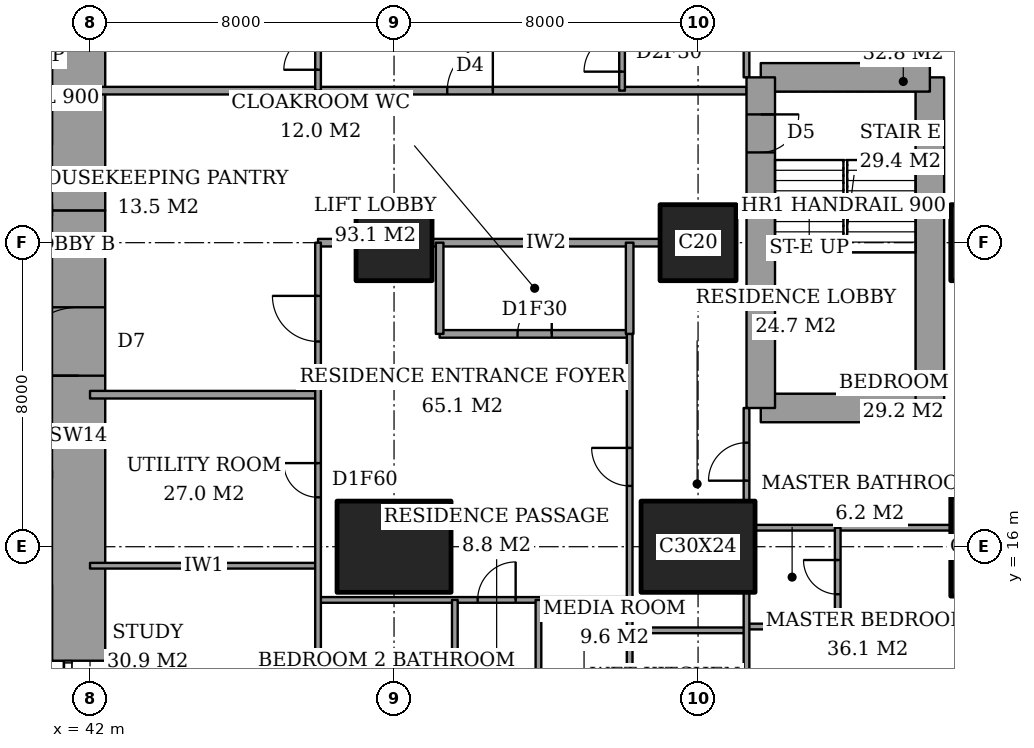
"""IFC4 building model, lengths in metres.
Left out: names, types, materials, properties, quantities, classifications, styles, units other than length and angle.
Written with IfcOpenShell. Run it as: python <this file> out.ifc"""

import sys

from ifc_helpers import new_model, si_unit, direction, frame, frame_2d, origin, origin_2d, place, context, subcontext, project, spatial, rectangle, extrude, element, fill, save


model = new_model("IFC4")
c1 = context("Model", 3, precision=1e-05, world=origin(), true_north=direction((0.0, 1.0)))
c2 = subcontext(c1, "Body", "Model", "MODEL_VIEW")
j1 = project(units=[si_unit("LENGTHUNIT", "METRE"), si_unit("PLANEANGLEUNIT", "RADIAN")], contexts=[c1])
p1 = place(None, origin())
s1 = spatial("IfcSite", under=j1, at=p1, CompositionType="ELEMENT")
p2 = place(p1, origin())
s2 = spatial("IfcBuilding", under=s1, at=p2, CompositionType="ELEMENT")
p3 = place(p2, frame((0.0, 0.0, 40.4)))
s3 = spatial("IfcBuildingStorey", under=s2, at=p3, CompositionType="ELEMENT", Elevation=40.4)
p4 = place(p3, frame((50.0, 16.0, 0.0), z_axis=(0.0, 0.0, 1.0), x_axis=(1.0, 0.0, 0.0)))
e1 = element("IfcColumn", 1, at=p4, inside=s3, PredefinedType="COLUMN", context=c2, shape_type="SweptSolid", body=[
    extrude(rectangle(XDim=3.0, YDim=2.4, at=origin_2d()), origin(), (0.0, 0.0, 1.0), 3.6),
])
p5 = place(p3, frame((50.0, 24.0, 0.0), z_axis=(0.0, 0.0, 1.0), x_axis=(1.0, 0.0, 0.0)))
e2 = element("IfcColumn", 2, at=p5, inside=s3, PredefinedType="COLUMN", context=c2, shape_type="SweptSolid", body=[
    extrude(rectangle(XDim=2.0, YDim=2.0, at=origin_2d()), origin(), (0.0, 0.0, 1.0), 3.6),
])
p6 = place(p3, frame((58.0, 16.0, 0.0), z_axis=(0.0, 0.0, 1.0), x_axis=(1.0, 0.0, 0.0)))
e3 = element("IfcColumn", 3, at=p6, inside=s3, PredefinedType="COLUMN", context=c2, shape_type="SweptSolid", body=[
    extrude(rectangle(XDim=3.0, YDim=2.4, at=origin_2d()), origin(), (0.0, 0.0, 1.0), 3.6),
])
p7 = place(p3, frame((58.0, 24.0, 0.0), z_axis=(0.0, 0.0, 1.0), x_axis=(1.0, 0.0, 0.0)))
e4 = element("IfcColumn", 4, at=p7, inside=s3, PredefinedType="COLUMN", context=c2, shape_type="SweptSolid", body=[
    extrude(rectangle(XDim=2.0, YDim=2.0, at=origin_2d()), origin(), (0.0, 0.0, 1.0), 3.6),
])
p8 = place(p3, frame((65.65, 16.0, 0.0), z_axis=(0.0, 0.0, 1.0), x_axis=(0.0, 1.0, 0.0)))
e5 = element("IfcColumn", 5, at=p8, inside=s3, PredefinedType="COLUMN", context=c2, shape_type="SweptSolid", body=[
    extrude(rectangle(XDim=2.6, YDim=2.0, at=origin_2d()), origin(), (0.0, 0.0, 1.0), 3.6),
])
p9 = place(p3, frame((65.65, 24.0, 0.0), z_axis=(0.0, 0.0, 1.0), x_axis=(1.0, 0.0, 0.0)))
e6 = element("IfcColumn", 6, at=p9, inside=s3, PredefinedType="COLUMN", context=c2, shape_type="SweptSolid", body=[
    extrude(rectangle(XDim=2.0, YDim=2.0, at=origin_2d()), origin(), (0.0, 0.0, 1.0), 3.6),
])
p10 = place(p3, frame((41.7, 13.0, 0.0), z_axis=(0.0, 0.0, 1.0), x_axis=(0.0, 1.0, 0.0)))
e7 = element("IfcWall", 7, at=p10, inside=s3, PredefinedType="SHEAR", context=c2, shape_type="SweptSolid", body=[
    extrude(rectangle(XDim=11.85, YDim=1.4, at=frame_2d((5.925, 0.0))), origin(), (0.0, 0.0, 1.0), 3.6),
])
p11 = place(p10, frame((7.5, 0.0, 0.0)))
e8 = element("IfcOpeningElement", 8, at=p11, cuts=e7, PredefinedType="OPENING", context=c2, shape_type="SweptSolid", body=[
    extrude(rectangle(XDim=1.8, YDim=2.4, at=frame_2d((0.9, 1.2))), frame((0.0, 0.71, 0.0), z_axis=(0.0, -1.0, 0.0), x_axis=(1.0, 0.0, 0.0)), (0.0, 0.0, 1.0), 1.42),
])
p12 = place(p3, frame((41.7, 24.85, 0.0), z_axis=(0.0, 0.0, 1.0), x_axis=(0.0, 1.0, 0.0)))
e9 = element("IfcWall", 9, at=p12, inside=s3, PredefinedType="SHEAR", context=c2, shape_type="SweptSolid", body=[
    extrude(rectangle(XDim=10.15, YDim=1.4, at=frame_2d((5.075, 0.0))), origin(), (0.0, 0.0, 1.0), 3.6),
])
p13 = place(p3, frame((59.65, 19.65, 0.0), z_axis=(0.0, 0.0, 1.0), x_axis=(1.0, 0.0, 0.0)))
e10 = element("IfcWall", 10, at=p13, inside=s3, PredefinedType="SHEAR", context=c2, shape_type="SweptSolid", body=[
    extrude(rectangle(XDim=4.45, YDim=0.75, at=frame_2d((2.225, 0.0))), origin(), (0.0, 0.0, 1.0), 3.6),
])
p14 = place(p3, frame((64.1, 19.65, 0.0), z_axis=(0.0, 0.0, 1.0), x_axis=(0.0, 1.0, 0.0)))
e11 = element("IfcWall", 11, at=p14, inside=s3, PredefinedType="SHEAR", context=c2, shape_type="SweptSolid", body=[
    extrude(rectangle(XDim=8.7, YDim=0.75, at=frame_2d((4.35, 0.0))), origin(), (0.0, 0.0, 1.0), 3.6),
])
p15 = place(p3, frame((64.1, 28.35, 0.0), z_axis=(0.0, 0.0, 1.0), x_axis=(-1.0, 0.0, 0.0)))
e12 = element("IfcWall", 12, at=p15, inside=s3, PredefinedType="SHEAR", context=c2, shape_type="SweptSolid", body=[
    extrude(rectangle(XDim=4.45, YDim=0.75, at=frame_2d((2.225, 0.0))), origin(), (0.0, 0.0, 1.0), 3.6),
])
p16 = place(p3, frame((59.65, 28.35, 0.0), z_axis=(0.0, 0.0, 1.0), x_axis=(0.0, -1.0, 0.0)))
e13 = element("IfcWall", 13, at=p16, inside=s3, PredefinedType="SHEAR", context=c2, shape_type="SweptSolid", body=[
    extrude(rectangle(XDim=8.7, YDim=0.75, at=frame_2d((4.35, 0.0))), origin(), (0.0, 0.0, 1.0), 3.6),
])
p17 = place(p16, frame((0.975, 0.0, 0.0)))
e14 = element("IfcOpeningElement", 14, at=p17, cuts=e13, PredefinedType="OPENING", context=c2, shape_type="SweptSolid", body=[
    extrude(rectangle(XDim=1.0, YDim=2.1, at=frame_2d((0.5, 1.05))), frame((0.0, 0.385, 0.0), z_axis=(0.0, -1.0, 0.0), x_axis=(1.0, 0.0, 0.0)), (0.0, 0.0, 1.0), 0.77),
])
p18 = place(p3, frame((56.2, 13.8, 0.0), z_axis=(0.0, 0.0, 1.0), x_axis=(1.0, 0.0, 0.0)))
e15 = element("IfcWall", 15, at=p18, inside=s3, PredefinedType="PARTITIONING", context=c2, shape_type="SweptSolid", body=[
    extrude(rectangle(XDim=3.075, YDim=0.15, at=frame_2d((1.538, 0.0))), origin(), (0.0, 0.0, 1.0), 3.35),
])
p19 = place(p3, frame((59.275, 13.9, 0.0), z_axis=(0.0, 0.0, 1.0), x_axis=(1.0, 0.0, 0.0)))
e16 = element("IfcWall", 16, at=p19, inside=s3, PredefinedType="PARTITIONING", context=c2, shape_type="SweptSolid", body=[
    extrude(rectangle(XDim=2.4, YDim=0.15, at=frame_2d((1.2, 0.0))), origin(), (0.0, 0.0, 1.0), 3.35),
])
p20 = place(p3, frame((48.0, 14.6, 0.0), z_axis=(0.0, 0.0, 1.0), x_axis=(1.0, 0.0, 0.0)))
e17 = element("IfcWall", 17, at=p20, inside=s3, PredefinedType="PARTITIONING", context=c2, shape_type="SweptSolid", body=[
    extrude(rectangle(XDim=8.2, YDim=0.15, at=frame_2d((4.1, 0.0))), origin(), (0.0, 0.0, 1.0), 3.35),
])
p21 = place(p20, frame((4.2, 0.0, 0.0)))
e18 = element("IfcOpeningElement", 18, at=p21, cuts=e17, PredefinedType="OPENING", context=c2, shape_type="SweptSolid", body=[
    extrude(rectangle(XDim=1.0, YDim=2.1, at=frame_2d((0.5, 1.05))), frame((0.0, 0.085, 0.0), z_axis=(0.0, -1.0, 0.0), x_axis=(1.0, 0.0, 0.0)), (0.0, 0.0, 1.0), 0.17),
])
p22 = place(p3, frame((42.0, 15.5, 0.0), z_axis=(0.0, 0.0, 1.0), x_axis=(1.0, 0.0, 0.0)))
e19 = element("IfcWall", 19, at=p22, inside=s3, PredefinedType="PARTITIONING", context=c2, shape_type="SweptSolid", body=[
    extrude(rectangle(XDim=6.0, YDim=0.15, at=frame_2d((3.0, 0.0))), origin(), (0.0, 0.0, 1.0), 3.35),
])
p23 = place(p3, frame((59.5, 16.5, 0.0), z_axis=(0.0, 0.0, 1.0), x_axis=(1.0, 0.0, 0.0)))
e20 = element("IfcWall", 20, at=p23, inside=s3, PredefinedType="PARTITIONING", context=c2, shape_type="SweptSolid", body=[
    extrude(rectangle(XDim=5.15, YDim=0.15, at=frame_2d((2.575, 0.0))), origin(), (0.0, 0.0, 1.0), 3.35),
])
p24 = place(p3, frame((42.0, 20.0, 0.0), z_axis=(0.0, 0.0, 1.0), x_axis=(1.0, 0.0, 0.0)))
e21 = element("IfcWall", 21, at=p24, inside=s3, PredefinedType="PARTITIONING", context=c2, shape_type="SweptSolid", body=[
    extrude(rectangle(XDim=6.0, YDim=0.2, at=frame_2d((3.0, 0.0))), origin(), (0.0, 0.0, 1.0), 3.35),
])
p25 = place(p3, frame((51.2, 21.6, 0.0), z_axis=(0.0, 0.0, 1.0), x_axis=(1.0, 0.0, 0.0)))
e22 = element("IfcWall", 22, at=p25, inside=s3, PredefinedType="PARTITIONING", context=c2, shape_type="SweptSolid", body=[
    extrude(rectangle(XDim=5.0, YDim=0.2, at=frame_2d((2.5, 0.0))), origin(), (0.0, 0.0, 1.0), 3.35),
])
p26 = place(p25, frame((2.05, 0.0, 0.0)))
e23 = element("IfcOpeningElement", 23, at=p26, cuts=e22, PredefinedType="OPENING", context=c2, shape_type="SweptSolid", body=[
    extrude(rectangle(XDim=0.9, YDim=2.1, at=frame_2d((0.45, 1.05))), frame((0.0, 0.11, 0.0), z_axis=(0.0, -1.0, 0.0), x_axis=(1.0, 0.0, 0.0)), (0.0, 0.0, 1.0), 0.22),
])
p27 = place(p3, frame((48.0, 24.0, 0.0), z_axis=(0.0, 0.0, 1.0), x_axis=(1.0, 0.0, 0.0)))
e24 = element("IfcWall", 24, at=p27, inside=s3, PredefinedType="PARTITIONING", context=c2, shape_type="SweptSolid", body=[
    extrude(rectangle(XDim=1.0, YDim=0.2, at=frame_2d((0.5, 0.0))), origin(), (0.0, 0.0, 1.0), 3.35),
])
p28 = place(p3, frame((51.0, 24.0, 0.0), z_axis=(0.0, 0.0, 1.0), x_axis=(1.0, 0.0, 0.0)))
e25 = element("IfcWall", 25, at=p28, inside=s3, PredefinedType="PARTITIONING", context=c2, shape_type="SweptSolid", body=[
    extrude(rectangle(XDim=6.0, YDim=0.2, at=frame_2d((3.0, 0.0))), origin(), (0.0, 0.0, 1.0), 3.35),
])
p29 = place(p3, frame((42.0, 28.0, 0.0), z_axis=(0.0, 0.0, 1.0), x_axis=(1.0, 0.0, 0.0)))
e26 = element("IfcWall", 26, at=p29, inside=s3, PredefinedType="PARTITIONING", context=c2, shape_type="SweptSolid", body=[
    extrude(rectangle(XDim=17.275, YDim=0.2, at=frame_2d((8.637, 0.0))), origin(), (0.0, 0.0, 1.0), 3.35),
])
p30 = place(p29, frame((9.4, 0.0, 0.0)))
e27 = element("IfcOpeningElement", 27, at=p30, cuts=e26, PredefinedType="OPENING", context=c2, shape_type="SweptSolid", body=[
    extrude(rectangle(XDim=1.2, YDim=2.4, at=frame_2d((0.6, 1.2))), frame((0.0, 0.11, 0.0), z_axis=(0.0, -1.0, 0.0), x_axis=(1.0, 0.0, 0.0)), (0.0, 0.0, 1.0), 0.22),
])
p31 = place(p3, frame((48.0, 10.6, 0.0), z_axis=(0.0, 0.0, 1.0), x_axis=(0.0, 1.0, 0.0)))
e28 = element("IfcWall", 28, at=p31, inside=s3, PredefinedType="PARTITIONING", context=c2, shape_type="SweptSolid", body=[
    extrude(rectangle(XDim=13.4, YDim=0.15, at=frame_2d((6.7, 0.0))), origin(), (0.0, 0.0, 1.0), 3.35),
])
p32 = place(p31, frame((10.8, 0.0, 0.0)))
e29 = element("IfcOpeningElement", 29, at=p32, cuts=e28, PredefinedType="OPENING", context=c2, shape_type="SweptSolid", body=[
    extrude(rectangle(XDim=1.2, YDim=2.4, at=frame_2d((0.6, 1.2))), frame((0.0, 0.085, 0.0), z_axis=(0.0, -1.0, 0.0), x_axis=(1.0, 0.0, 0.0)), (0.0, 0.0, 1.0), 0.17),
])
p33 = place(p31, frame((6.7, 0.0, 0.0)))
e30 = element("IfcOpeningElement", 30, at=p33, cuts=e28, PredefinedType="OPENING", context=c2, shape_type="SweptSolid", body=[
    extrude(rectangle(XDim=0.9, YDim=2.1, at=frame_2d((0.45, 1.05))), frame((0.0, 0.085, 0.0), z_axis=(0.0, -1.0, 0.0), x_axis=(1.0, 0.0, 0.0)), (0.0, 0.0, 1.0), 0.17),
])
p34 = place(p3, frame((48.0, 28.0, 0.0), z_axis=(0.0, 0.0, 1.0), x_axis=(0.0, 1.0, 0.0)))
e31 = element("IfcWall", 31, at=p34, inside=s3, PredefinedType="PARTITIONING", context=c2, shape_type="SweptSolid", body=[
    extrude(rectangle(XDim=9.4, YDim=0.15, at=frame_2d((4.7, 0.0))), origin(), (0.0, 0.0, 1.0), 3.35),
])
p35 = place(p34, frame((0.55, 0.0, 0.0)))
e32 = element("IfcOpeningElement", 32, at=p35, cuts=e31, PredefinedType="OPENING", context=c2, shape_type="SweptSolid", body=[
    extrude(rectangle(XDim=0.9, YDim=2.1, at=frame_2d((0.45, 1.05))), frame((0.0, 0.085, 0.0), z_axis=(0.0, -1.0, 0.0), x_axis=(1.0, 0.0, 0.0)), (0.0, 0.0, 1.0), 0.17),
])
p36 = place(p3, frame((51.2, 21.6, 0.0), z_axis=(0.0, 0.0, 1.0), x_axis=(0.0, 1.0, 0.0)))
e33 = element("IfcWall", 33, at=p36, inside=s3, PredefinedType="PARTITIONING", context=c2, shape_type="SweptSolid", body=[
    extrude(rectangle(XDim=2.4, YDim=0.2, at=frame_2d((1.2, 0.0))), origin(), (0.0, 0.0, 1.0), 3.35),
])
for number, where, z_axis, x_axis in (
    (34, (51.6, 10.6, 0.0), (0.0, 0.0, 1.0), (0.0, 1.0, 0.0)),
    (35, (53.8, 10.6, 0.0), (0.0, 0.0, 1.0), (0.0, 1.0, 0.0)),
):
    element("IfcWall", number, at=place(p3, frame(where, z_axis=z_axis, x_axis=x_axis)), inside=s3, PredefinedType="PARTITIONING", context=c2, shape_type="SweptSolid", body=[
        extrude(rectangle(XDim=4.0, YDim=0.15, at=frame_2d((2.0, 0.0))), origin(), (0.0, 0.0, 1.0), 3.35),
    ])
p37 = place(p3, frame((56.0, 28.0, 0.0), z_axis=(0.0, 0.0, 1.0), x_axis=(0.0, 1.0, 0.0)))
e36 = element("IfcWall", 36, at=p37, inside=s3, PredefinedType="PARTITIONING", context=c2, shape_type="SweptSolid", body=[
    extrude(rectangle(XDim=9.4, YDim=0.15, at=frame_2d((4.7, 0.0))), origin(), (0.0, 0.0, 1.0), 3.35),
])
p38 = place(p37, frame((0.5, 0.0, 0.0)))
e37 = element("IfcOpeningElement", 37, at=p38, cuts=e36, PredefinedType="OPENING", context=c2, shape_type="SweptSolid", body=[
    extrude(rectangle(XDim=1.0, YDim=2.1, at=frame_2d((0.5, 1.05))), frame((0.0, 0.085, 0.0), z_axis=(0.0, -1.0, 0.0), x_axis=(1.0, 0.0, 0.0)), (0.0, 0.0, 1.0), 0.17),
])
p39 = place(p3, frame((56.2, 21.6, 0.0), z_axis=(0.0, 0.0, 1.0), x_axis=(0.0, 1.0, 0.0)))
e38 = element("IfcWall", 38, at=p39, inside=s3, PredefinedType="PARTITIONING", context=c2, shape_type="SweptSolid", body=[
    extrude(rectangle(XDim=2.4, YDim=0.2, at=frame_2d((1.2, 0.0))), origin(), (0.0, 0.0, 1.0), 3.35),
])
p40 = place(p3, frame((56.2, 10.6, 0.0), z_axis=(0.0, 0.0, 1.0), x_axis=(0.0, 1.0, 0.0)))
e39 = element("IfcWall", 39, at=p40, inside=s3, PredefinedType="PARTITIONING", context=c2, shape_type="SweptSolid", body=[
    extrude(rectangle(XDim=11.0, YDim=0.15, at=frame_2d((5.5, 0.0))), origin(), (0.0, 0.0, 1.0), 3.35),
])
p41 = place(p40, frame((7.0, 0.0, 0.0)))
e40 = element("IfcOpeningElement", 40, at=p41, cuts=e39, PredefinedType="OPENING", context=c2, shape_type="SweptSolid", body=[
    extrude(rectangle(XDim=1.0, YDim=2.1, at=frame_2d((0.5, 1.05))), frame((0.0, 0.085, 0.0), z_axis=(0.0, -1.0, 0.0), x_axis=(1.0, 0.0, 0.0)), (0.0, 0.0, 1.0), 0.17),
])
p42 = place(p3, frame((59.275, 10.6, 0.0), z_axis=(0.0, 0.0, 1.0), x_axis=(0.0, 1.0, 0.0)))
e41 = element("IfcWall", 41, at=p42, inside=s3, PredefinedType="PARTITIONING", context=c2, shape_type="SweptSolid", body=[
    extrude(rectangle(XDim=4.2, YDim=0.15, at=frame_2d((2.1, 0.0))), origin(), (0.0, 0.0, 1.0), 3.35),
])
p43 = place(p3, frame((59.275, 17.2, 0.0), z_axis=(0.0, 0.0, 1.0), x_axis=(0.0, 1.0, 0.0)))
e42 = element("IfcWall", 42, at=p43, inside=s3, PredefinedType="PARTITIONING", context=c2, shape_type="SweptSolid", body=[
    extrude(rectangle(XDim=2.45, YDim=0.15, at=frame_2d((1.225, 0.0))), origin(), (0.0, 0.0, 1.0), 3.35),
])
p44 = place(p43, frame((0.538, 0.0, 0.0)))
e43 = element("IfcOpeningElement", 43, at=p44, cuts=e42, PredefinedType="OPENING", context=c2, shape_type="SweptSolid", body=[
    extrude(rectangle(XDim=1.0, YDim=2.1, at=frame_2d((0.5, 1.05))), frame((0.0, 0.085, 0.0), z_axis=(0.0, -1.0, 0.0), x_axis=(1.0, 0.0, 0.0)), (0.0, 0.0, 1.0), 0.17),
])
p45 = place(p3, frame((59.275, 28.35, 0.0), z_axis=(0.0, 0.0, 1.0), x_axis=(0.0, 1.0, 0.0)))
e44 = element("IfcWall", 44, at=p45, inside=s3, PredefinedType="PARTITIONING", context=c2, shape_type="SweptSolid", body=[
    extrude(rectangle(XDim=2.45, YDim=0.15, at=frame_2d((1.225, 0.0))), origin(), (0.0, 0.0, 1.0), 3.35),
])
p46 = place(p45, frame((0.913, 0.0, 0.0)))
e45 = element("IfcOpeningElement", 45, at=p46, cuts=e44, PredefinedType="OPENING", context=c2, shape_type="SweptSolid", body=[
    extrude(rectangle(XDim=1.0, YDim=2.1, at=frame_2d((0.5, 1.05))), frame((0.0, 0.085, 0.0), z_axis=(0.0, -1.0, 0.0), x_axis=(1.0, 0.0, 0.0)), (0.0, 0.0, 1.0), 0.17),
])
p47 = place(p3, frame((61.675, 13.9, 0.0), z_axis=(0.0, 0.0, 1.0), x_axis=(0.0, 1.0, 0.0)))
e46 = element("IfcWall", 46, at=p47, inside=s3, PredefinedType="PARTITIONING", context=c2, shape_type="SweptSolid", body=[
    extrude(rectangle(XDim=2.6, YDim=0.15, at=frame_2d((1.3, 0.0))), origin(), (0.0, 0.0, 1.0), 3.35),
])
p48 = place(p47, frame((0.85, 0.0, 0.0)))
e47 = element("IfcOpeningElement", 47, at=p48, cuts=e46, PredefinedType="OPENING", context=c2, shape_type="SweptSolid", body=[
    extrude(rectangle(XDim=0.9, YDim=2.1, at=frame_2d((0.45, 1.05))), frame((0.0, 0.085, 0.0), z_axis=(0.0, -1.0, 0.0), x_axis=(1.0, 0.0, 0.0)), (0.0, 0.0, 1.0), 0.17),
])
p49 = place(p3, frame((28.3, 17.9, 0.0), z_axis=(0.0, 0.0, 1.0), x_axis=(1.0, 0.0, 0.0)))
e48 = element("IfcWall", 48, at=p49, inside=s3, PredefinedType="PARTITIONING", context=c2, shape_type="SweptSolid", body=[
    extrude(rectangle(XDim=12.7, YDim=0.2, at=frame_2d((6.35, 0.0))), origin(), (0.0, 0.0, 1.0), 3.6),
])
p50 = place(p49, frame((0.95, 0.0, 0.0)))
e49 = element("IfcOpeningElement", 49, at=p50, cuts=e48, PredefinedType="OPENING", context=c2, shape_type="SweptSolid", body=[
    extrude(rectangle(XDim=1.1, YDim=2.1, at=frame_2d((0.55, 1.05))), frame((0.0, 0.11, 0.0), z_axis=(0.0, -1.0, 0.0), x_axis=(1.0, 0.0, 0.0)), (0.0, 0.0, 1.0), 0.22),
])
p51 = place(p49, frame((4.15, 0.0, 0.0)))
e50 = element("IfcOpeningElement", 50, at=p51, cuts=e48, PredefinedType="OPENING", context=c2, shape_type="SweptSolid", body=[
    extrude(rectangle(XDim=1.1, YDim=2.1, at=frame_2d((0.55, 1.05))), frame((0.0, 0.11, 0.0), z_axis=(0.0, -1.0, 0.0), x_axis=(1.0, 0.0, 0.0)), (0.0, 0.0, 1.0), 0.22),
])
p52 = place(p49, frame((7.35, 0.0, 0.0)))
e51 = element("IfcOpeningElement", 51, at=p52, cuts=e48, PredefinedType="OPENING", context=c2, shape_type="SweptSolid", body=[
    extrude(rectangle(XDim=1.1, YDim=2.1, at=frame_2d((0.55, 1.05))), frame((0.0, 0.11, 0.0), z_axis=(0.0, -1.0, 0.0), x_axis=(1.0, 0.0, 0.0)), (0.0, 0.0, 1.0), 0.22),
])
p53 = place(p49, frame((10.6, 0.0, 0.0)))
e52 = element("IfcOpeningElement", 52, at=p53, cuts=e48, PredefinedType="OPENING", context=c2, shape_type="SweptSolid", body=[
    extrude(rectangle(XDim=1.2, YDim=2.1, at=frame_2d((0.6, 1.05))), frame((0.0, 0.11, 0.0), z_axis=(0.0, -1.0, 0.0), x_axis=(1.0, 0.0, 0.0)), (0.0, 0.0, 1.0), 0.22),
])
p54 = place(p48, origin())
e53 = element("IfcDoor", 53, at=p54, inside=s3, OperationType="SINGLE_SWING_LEFT", PredefinedType="DOOR", context=c2, shape_type="SweptSolid", body=[
    extrude(rectangle(XDim=0.9, YDim=2.1, at=frame_2d((0.45, 1.05))), frame((0.0, 0.025, 0.0), z_axis=(0.0, -1.0, 0.0), x_axis=(1.0, 0.0, 0.0)), (0.0, 0.0, 1.0), 0.05),
])
fill(e47, e53)
p55 = place(p44, origin())
e54 = element("IfcDoor", 54, at=p55, inside=s3, OperationType="SINGLE_SWING_RIGHT", PredefinedType="DOOR", context=c2, shape_type="SweptSolid", body=[
    extrude(rectangle(XDim=1.0, YDim=2.1, at=frame_2d((0.5, 1.05))), frame((0.0, 0.025, 0.0), z_axis=(0.0, -1.0, 0.0), x_axis=(1.0, 0.0, 0.0)), (0.0, 0.0, 1.0), 0.05),
])
fill(e43, e54)
p56 = place(p41, origin())
e55 = element("IfcDoor", 55, at=p56, inside=s3, OperationType="SINGLE_SWING_LEFT", PredefinedType="DOOR", context=c2, shape_type="SweptSolid", body=[
    extrude(rectangle(XDim=1.0, YDim=2.1, at=frame_2d((0.5, 1.05))), frame((0.0, 0.025, 0.0), z_axis=(0.0, -1.0, 0.0), x_axis=(1.0, 0.0, 0.0)), (0.0, 0.0, 1.0), 0.05),
])
fill(e40, e55)
p57 = place(p26, origin())
e56 = element("IfcDoor", 56, at=p57, inside=s3, OperationType="SINGLE_SWING_LEFT", PredefinedType="DOOR", context=c2, shape_type="SweptSolid", body=[
    extrude(rectangle(XDim=0.9, YDim=2.1, at=frame_2d((0.45, 1.05))), frame((0.0, 0.025, 0.0), z_axis=(0.0, -1.0, 0.0), x_axis=(1.0, 0.0, 0.0)), (0.0, 0.0, 1.0), 0.05),
])
fill(e23, e56)
p58 = place(p32, origin())
e57 = element("IfcDoor", 57, at=p58, inside=s3, OperationType="SINGLE_SWING_LEFT", PredefinedType="DOOR", context=c2, shape_type="SweptSolid", body=[
    extrude(rectangle(XDim=1.2, YDim=2.4, at=frame_2d((0.6, 1.2))), frame((0.0, 0.025, 0.0), z_axis=(0.0, -1.0, 0.0), x_axis=(1.0, 0.0, 0.0)), (0.0, 0.0, 1.0), 0.05),
])
fill(e29, e57)
p59 = place(p21, origin())
e58 = element("IfcDoor", 58, at=p59, inside=s3, OperationType="SINGLE_SWING_LEFT", PredefinedType="DOOR", context=c2, shape_type="SweptSolid", body=[
    extrude(rectangle(XDim=1.0, YDim=2.1, at=frame_2d((0.5, 1.05))), frame((0.0, 0.025, 0.0), z_axis=(0.0, -1.0, 0.0), x_axis=(1.0, 0.0, 0.0)), (0.0, 0.0, 1.0), 0.05),
])
fill(e18, e58)
p60 = place(p33, origin())
e59 = element("IfcDoor", 59, at=p60, inside=s3, OperationType="SINGLE_SWING_LEFT", PredefinedType="DOOR", context=c2, shape_type="SweptSolid", body=[
    extrude(rectangle(XDim=0.9, YDim=2.1, at=frame_2d((0.45, 1.05))), frame((0.0, 0.025, 0.0), z_axis=(0.0, -1.0, 0.0), x_axis=(1.0, 0.0, 0.0)), (0.0, 0.0, 1.0), 0.05),
])
fill(e30, e59)
p61 = place(p38, origin())
e60 = element("IfcDoor", 60, at=p61, inside=s3, OperationType="SINGLE_SWING_RIGHT", PredefinedType="DOOR", context=c2, shape_type="SweptSolid", body=[
    extrude(rectangle(XDim=1.0, YDim=2.1, at=frame_2d((0.5, 1.05))), frame((0.0, 0.025, 0.0), z_axis=(0.0, -1.0, 0.0), x_axis=(1.0, 0.0, 0.0)), (0.0, 0.0, 1.0), 0.05),
])
fill(e37, e60)
p62 = place(p30, origin())
e61 = element("IfcDoor", 61, at=p62, inside=s3, OperationType="SINGLE_SWING_LEFT", PredefinedType="DOOR", context=c2, shape_type="SweptSolid", body=[
    extrude(rectangle(XDim=1.2, YDim=2.4, at=frame_2d((0.6, 1.2))), frame((0.0, 0.025, 0.0), z_axis=(0.0, -1.0, 0.0), x_axis=(1.0, 0.0, 0.0)), (0.0, 0.0, 1.0), 0.05),
])
fill(e27, e61)
p63 = place(p35, origin())
e62 = element("IfcDoor", 62, at=p63, inside=s3, OperationType="SINGLE_SWING_RIGHT", PredefinedType="DOOR", context=c2, shape_type="SweptSolid", body=[
    extrude(rectangle(XDim=0.9, YDim=2.1, at=frame_2d((0.45, 1.05))), frame((0.0, 0.025, 0.0), z_axis=(0.0, -1.0, 0.0), x_axis=(1.0, 0.0, 0.0)), (0.0, 0.0, 1.0), 0.05),
])
fill(e32, e62)
p64 = place(p11, origin())
e63 = element("IfcDoor", 63, at=p64, inside=s3, OperationType="DOUBLE_DOOR_DOUBLE_SWING", PredefinedType="DOOR", context=c2, shape_type="SweptSolid", body=[
    extrude(rectangle(XDim=1.8, YDim=2.4, at=frame_2d((0.9, 1.2))), frame((0.0, 0.025, 0.0), z_axis=(0.0, -1.0, 0.0), x_axis=(1.0, 0.0, 0.0)), (0.0, 0.0, 1.0), 0.05),
])
fill(e8, e63)
p65 = place(p17, origin())
e64 = element("IfcDoor", 64, at=p65, inside=s3, OperationType="SINGLE_SWING_RIGHT", PredefinedType="DOOR", context=c2, shape_type="SweptSolid", body=[
    extrude(rectangle(XDim=1.0, YDim=2.1, at=frame_2d((0.5, 1.05))), frame((0.0, 0.025, 0.0), z_axis=(0.0, -1.0, 0.0), x_axis=(1.0, 0.0, 0.0)), (0.0, 0.0, 1.0), 0.05),
])
fill(e14, e64)
save(model, sys.argv[1])
